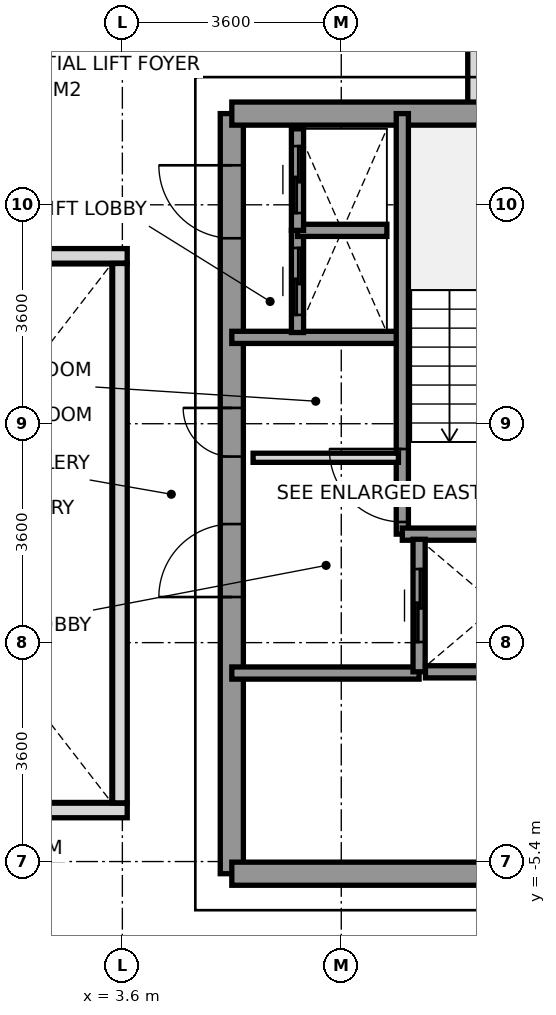
"""IFC4 building model, lengths in metres.
Left out: names, types, materials, properties, quantities, classifications, styles, units other than length and angle.
Written with IfcOpenShell. Run it as: python <this file> out.ifc"""

import sys

from ifc_helpers import new_model, si_unit, direction, frame, frame_2d, origin, place, context, subcontext, project, spatial, rectangle, extrude, source, transform, mapped, element, fill, save


model = new_model("IFC4")
c1 = context("Model", 3, precision=1e-05, world=origin(), true_north=direction((0.0, 1.0)))
c2 = subcontext(c1, "Body", "Model", "MODEL_VIEW")
j1 = project(units=[si_unit("LENGTHUNIT", "METRE"), si_unit("PLANEANGLEUNIT", "RADIAN")], contexts=[c1])
p1 = place(None, origin())
s1 = spatial("IfcSite", under=j1, at=p1, CompositionType="ELEMENT")
p2 = place(p1, origin())
s2 = spatial("IfcBuilding", under=s1, at=p2, CompositionType="ELEMENT")
p3 = place(p2, frame((0.0, 0.0, 211.4)))
s3 = spatial("IfcBuildingStorey", under=s2, at=p3, CompositionType="ELEMENT", Elevation=211.4)
p4 = place(p3, frame((9.4, 8.547, 0.0), z_axis=(0.0, 0.0, 1.0), x_axis=(0.0, -1.0, 0.0)))
e1 = element("IfcWall", 1, at=p4, inside=s3, PredefinedType="PARAPET", context=c2, shape_type="SweptSolid", body=[
    extrude(rectangle(XDim=1.594, YDim=0.24, at=frame_2d((0.797, 0.0))), origin(), (0.0, 0.0, 1.0), 1.15),
])
p5 = place(p3, frame((5.4, -5.6, 0.0), z_axis=(0.0, 0.0, 1.0), x_axis=(0.0, 1.0, 0.0)))
e2 = element("IfcWall", 2, at=p5, inside=s3, PredefinedType="SHEAR", context=c2, shape_type="SweptSolid", body=[
    extrude(rectangle(XDim=12.5, YDim=0.38, at=frame_2d((6.25, 0.0))), origin(), (0.0, 0.0, 1.0), 3.14),
])
p6 = place(p5, frame((4.55, 0.0, 0.0)))
e3 = element("IfcOpeningElement", 3, at=p6, cuts=e2, PredefinedType="OPENING", context=c2, shape_type="SweptSolid", body=[
    extrude(rectangle(XDim=1.2, YDim=2.2, at=frame_2d((0.6, 1.1))), frame((0.0, 0.2, 0.0), z_axis=(0.0, -1.0, 0.0), x_axis=(1.0, 0.0, 0.0)), (0.0, 0.0, 1.0), 0.4),
])
p7 = place(p5, frame((10.45, 0.0, 0.0)))
e4 = element("IfcOpeningElement", 4, at=p7, cuts=e2, PredefinedType="OPENING", context=c2, shape_type="SweptSolid", body=[
    extrude(rectangle(XDim=1.2, YDim=2.2, at=frame_2d((0.6, 1.1))), frame((0.0, 0.2, 0.0), z_axis=(0.0, -1.0, 0.0), x_axis=(1.0, 0.0, 0.0)), (0.0, 0.0, 1.0), 0.4),
])
p8 = place(p5, frame((6.86, 0.0, 0.0)))
e5 = element("IfcOpeningElement", 5, at=p8, cuts=e2, PredefinedType="OPENING", context=c2, shape_type="SweptSolid", body=[
    extrude(rectangle(XDim=0.8, YDim=2.1, at=frame_2d((0.4, 1.05))), frame((0.0, 0.2, 0.0), z_axis=(0.0, -1.0, 0.0), x_axis=(1.0, 0.0, 0.0)), (0.0, 0.0, 1.0), 0.4),
])
p9 = place(p3, frame((5.4, 6.9, 0.0), z_axis=(0.0, 0.0, 1.0), x_axis=(1.0, 0.0, 0.0)))
e6 = element("IfcWall", 6, at=p9, inside=s3, PredefinedType="SHEAR", context=c2, shape_type="SweptSolid", body=[
    extrude(rectangle(XDim=5.956, YDim=0.38, at=frame_2d((2.978, 0.0))), origin(), (0.0, 0.0, 1.0), 3.14),
])
p10 = place(p3, frame((5.4, -5.6, 0.0), z_axis=(0.0, 0.0, 1.0), x_axis=(1.0, 0.0, 0.0)))
e7 = element("IfcWall", 7, at=p10, inside=s3, PredefinedType="SHEAR", context=c2, shape_type="SweptSolid", body=[
    extrude(rectangle(XDim=7.8, YDim=0.38, at=frame_2d((3.9, 0.0))), origin(), (0.0, 0.0, 1.0), 3.14),
])
p11 = place(p3, frame((5.4, 3.22, 0.0), z_axis=(0.0, 0.0, 1.0), x_axis=(1.0, 0.0, 0.0)))
e8 = element("IfcWall", 8, at=p11, inside=s3, PredefinedType="SOLIDWALL", context=c2, shape_type="SweptSolid", body=[
    extrude(rectangle(XDim=2.78, YDim=0.2, at=frame_2d((1.39, 0.0))), origin(), (0.0, 0.0, 1.0), 3.14),
])
p12 = place(p3, frame((5.4, -2.3, 0.0), z_axis=(0.0, 0.0, 1.0), x_axis=(1.0, 0.0, 0.0)))
e9 = element("IfcWall", 9, at=p12, inside=s3, PredefinedType="SOLIDWALL", context=c2, shape_type="SweptSolid", body=[
    extrude(rectangle(XDim=3.08, YDim=0.2, at=frame_2d((1.54, 0.0))), origin(), (0.0, 0.0, 1.0), 3.14),
])
p13 = place(p3, frame((8.204, -0.016, 0.0), z_axis=(0.0, 0.0, 1.0), x_axis=(0.0, 1.0, 0.0)))
e10 = element("IfcWall", 10, at=p13, inside=s3, PredefinedType="SOLIDWALL", context=c2, shape_type="SweptSolid", body=[
    extrude(rectangle(XDim=6.916, YDim=0.2, at=frame_2d((3.458, 0.0))), origin(), (0.0, 0.0, 1.0), 3.14),
])
p14 = place(p13, frame((0.2, 0.0, 0.0)))
e11 = element("IfcOpeningElement", 11, at=p14, cuts=e10, PredefinedType="OPENING", context=c2, shape_type="SweptSolid", body=[
    extrude(rectangle(XDim=1.2, YDim=2.2, at=frame_2d((0.6, 1.1))), frame((0.0, 0.11, 0.0), z_axis=(0.0, -1.0, 0.0), x_axis=(1.0, 0.0, 0.0)), (0.0, 0.0, 1.0), 0.22),
])
p15 = place(p3, frame((8.204, -0.016, 0.0), z_axis=(0.0, 0.0, 1.0), x_axis=(1.0, 0.0, 0.0)))
e12 = element("IfcWall", 12, at=p15, inside=s3, PredefinedType="SOLIDWALL", context=c2, shape_type="SweptSolid", body=[
    extrude(rectangle(XDim=3.152, YDim=0.2, at=frame_2d((1.576, 0.0))), origin(), (0.0, 0.0, 1.0), 3.14),
])
p16 = place(p3, frame((8.48, -2.28, 0.0), z_axis=(0.0, 0.0, 1.0), x_axis=(0.0, 1.0, 0.0)))
e13 = element("IfcWall", 13, at=p16, inside=s3, PredefinedType="SOLIDWALL", context=c2, shape_type="SweptSolid", body=[
    extrude(rectangle(XDim=2.18, YDim=0.2, at=frame_2d((1.09, 0.0))), origin(), (0.0, 0.0, 1.0), 3.14),
])
p17 = place(p16, frame((0.49, 0.0, 0.0)))
e14 = element("IfcOpeningElement", 14, at=p17, cuts=e13, PredefinedType="OPENING", context=c2, shape_type="SweptSolid", body=[
    extrude(rectangle(XDim=1.2, YDim=2.2, at=frame_2d((0.6, 1.1))), frame((0.0, 0.11, 0.0), z_axis=(0.0, -1.0, 0.0), x_axis=(1.0, 0.0, 0.0)), (0.0, 0.0, 1.0), 0.22),
])
p18 = place(p3, frame((8.584, -2.28, 0.0), z_axis=(0.0, 0.0, 1.0), x_axis=(1.0, 0.0, 0.0)))
e15 = element("IfcWall", 15, at=p18, inside=s3, PredefinedType="SOLIDWALL", context=c2, shape_type="SweptSolid", body=[
    extrude(rectangle(XDim=2.362, YDim=0.2, at=frame_2d((1.181, 0.0))), origin(), (0.0, 0.0, 1.0), 3.14),
])
p19 = place(p3, frame((6.48, 3.3, 0.0), z_axis=(0.0, 0.0, 1.0), x_axis=(0.0, 1.0, 0.0)))
e16 = element("IfcWall", 16, at=p19, inside=s3, PredefinedType="SOLIDWALL", context=c2, shape_type="SweptSolid", body=[
    extrude(rectangle(XDim=1.68, YDim=0.2, at=frame_2d((0.84, 0.0))), origin(), (0.0, 0.0, 1.0), 3.14),
])
p20 = place(p19, frame((0.29, 0.0, 0.0)))
e17 = element("IfcOpeningElement", 17, at=p20, cuts=e16, PredefinedType="OPENING", context=c2, shape_type="SweptSolid", body=[
    extrude(rectangle(XDim=1.1, YDim=2.2, at=frame_2d((0.55, 1.1))), frame((0.0, 0.11, 0.0), z_axis=(0.0, -1.0, 0.0), x_axis=(1.0, 0.0, 0.0)), (0.0, 0.0, 1.0), 0.22),
])
p21 = place(p3, frame((6.48, 4.98, 0.0), z_axis=(0.0, 0.0, 1.0), x_axis=(1.0, 0.0, 0.0)))
e18 = element("IfcWall", 18, at=p21, inside=s3, PredefinedType="SOLIDWALL", context=c2, shape_type="SweptSolid", body=[
    extrude(rectangle(XDim=1.47, YDim=0.2, at=frame_2d((0.735, 0.0))), origin(), (0.0, 0.0, 1.0), 3.14),
])
p22 = place(p3, frame((6.48, 4.98, 0.0), z_axis=(0.0, 0.0, 1.0), x_axis=(0.0, 1.0, 0.0)))
e19 = element("IfcWall", 19, at=p22, inside=s3, PredefinedType="SOLIDWALL", context=c2, shape_type="SweptSolid", body=[
    extrude(rectangle(XDim=1.67, YDim=0.2, at=frame_2d((0.835, 0.0))), origin(), (0.0, 0.0, 1.0), 3.14),
])
p23 = place(p22, frame((0.285, 0.0, 0.0)))
e20 = element("IfcOpeningElement", 20, at=p23, cuts=e19, PredefinedType="OPENING", context=c2, shape_type="SweptSolid", body=[
    extrude(rectangle(XDim=1.1, YDim=2.2, at=frame_2d((0.55, 1.1))), frame((0.0, 0.11, 0.0), z_axis=(0.0, -1.0, 0.0), x_axis=(1.0, 0.0, 0.0)), (0.0, 0.0, 1.0), 0.22),
])
p24 = place(p3, frame((5.75, 1.24, 0.0), z_axis=(0.0, 0.0, 1.0), x_axis=(1.0, 0.0, 0.0)))
e21 = element("IfcWall", 21, at=p24, inside=s3, PredefinedType="PARTITIONING", context=c2, shape_type="SweptSolid", body=[
    extrude(rectangle(XDim=2.39, YDim=0.15, at=frame_2d((1.195, 0.0))), origin(), (0.0, 0.0, 1.0), 2.24),
])
for number, where, z_axis, x_axis in (
    (22, (-3.68, -4.56, 0.0), (0.0, 0.0, 1.0), (1.0, 0.0, 0.0)),
    (23, (-3.68, 4.56, 0.0), (0.0, 0.0, 1.0), (1.0, 0.0, 0.0)),
):
    element("IfcWall", number, at=place(p3, frame(where, z_axis=z_axis, x_axis=x_axis)), inside=s3, PredefinedType="PARAPET", context=c2, shape_type="SweptSolid", body=[
        extrude(rectangle(XDim=7.36, YDim=0.24, at=frame_2d((3.68, 0.0))), origin(), (0.0, 0.0, 1.0), 1.15),
    ])
p25 = place(p3, frame((3.56, -4.435, 0.0), z_axis=(0.0, 0.0, 1.0), x_axis=(0.0, 1.0, 0.0)))
e24 = element("IfcWall", 24, at=p25, inside=s3, PredefinedType="PARAPET", context=c2, shape_type="SweptSolid", body=[
    extrude(rectangle(XDim=8.87, YDim=0.24, at=frame_2d((4.435, 0.0))), origin(), (0.0, 0.0, 1.0), 1.15),
])
m1 = source(origin(), c2, "Body", "SweptSolid", [
    extrude(rectangle(XDim=1.2, YDim=2.2, at=frame_2d((0.6, 1.1))), frame((0.0, 0.025, 0.0), z_axis=(0.0, -1.0, 0.0), x_axis=(1.0, 0.0, 0.0)), (0.0, 0.0, 1.0), 0.05),
])
p26 = place(p14, origin())
e25 = element("IfcDoor", 25, at=p26, inside=s3, OperationType="SINGLE_SWING_RIGHT", PredefinedType="DOOR", context=c2, shape_type="MappedRepresentation", body=[
    mapped(m1, transform((0.0, 0.0, 0.0), x_axis=(1.0, 0.0, 0.0), y_axis=(0.0, 1.0, 0.0), z_axis=(0.0, 0.0, 1.0), scale=1.0)),
])
fill(e11, e25)
p27 = place(p6, origin())
e26 = element("IfcDoor", 26, at=p27, inside=s3, OperationType="SINGLE_SWING_LEFT", PredefinedType="DOOR", context=c2, shape_type="MappedRepresentation", body=[
    mapped(m1, transform((0.0, 0.0, 0.0), x_axis=(1.0, 0.0, 0.0), y_axis=(0.0, 1.0, 0.0), z_axis=(0.0, 0.0, 1.0), scale=1.0)),
])
fill(e3, e26)
p28 = place(p7, origin())
e27 = element("IfcDoor", 27, at=p28, inside=s3, OperationType="SINGLE_SWING_RIGHT", PredefinedType="DOOR", context=c2, shape_type="MappedRepresentation", body=[
    mapped(m1, transform((0.0, 0.0, 0.0), x_axis=(1.0, 0.0, 0.0), y_axis=(0.0, 1.0, 0.0), z_axis=(0.0, 0.0, 1.0), scale=1.0)),
])
fill(e4, e27)
m2 = source(origin(), c2, "Body", "SweptSolid", [
    extrude(rectangle(XDim=0.8, YDim=2.1, at=frame_2d((0.4, 1.05))), frame((0.0, 0.025, 0.0), z_axis=(0.0, -1.0, 0.0), x_axis=(1.0, 0.0, 0.0)), (0.0, 0.0, 1.0), 0.05),
])
p29 = place(p8, origin())
e28 = element("IfcDoor", 28, at=p29, inside=s3, OperationType="SINGLE_SWING_RIGHT", PredefinedType="DOOR", context=c2, shape_type="MappedRepresentation", body=[
    mapped(m2, transform((0.0, 0.0, 0.0), x_axis=(1.0, 0.0, 0.0), y_axis=(0.0, 1.0, 0.0), z_axis=(0.0, 0.0, 1.0), scale=1.0)),
])
fill(e5, e28)
p30 = place(p17, origin())
e29 = element("IfcDoor", 29, at=p30, inside=s3, OperationType="SLIDING_TO_RIGHT", PredefinedType="DOOR", context=c2, shape_type="MappedRepresentation", body=[
    mapped(m1, transform((0.0, 0.0, 0.0), x_axis=(1.0, 0.0, 0.0), y_axis=(0.0, 1.0, 0.0), z_axis=(0.0, 0.0, 1.0), scale=1.0)),
])
fill(e14, e29)
m3 = source(origin(), c2, "Body", "SweptSolid", [
    extrude(rectangle(XDim=1.1, YDim=2.2, at=frame_2d((0.55, 1.1))), frame((0.0, 0.025, 0.0), z_axis=(0.0, -1.0, 0.0), x_axis=(1.0, 0.0, 0.0)), (0.0, 0.0, 1.0), 0.05),
])
p31 = place(p20, origin())
e30 = element("IfcDoor", 30, at=p31, inside=s3, OperationType="SLIDING_TO_LEFT", PredefinedType="DOOR", context=c2, shape_type="MappedRepresentation", body=[
    mapped(m3, transform((0.0, 0.0, 0.0), x_axis=(1.0, 0.0, 0.0), y_axis=(0.0, 1.0, 0.0), z_axis=(0.0, 0.0, 1.0), scale=1.0)),
])
fill(e17, e30)
p32 = place(p23, origin())
e31 = element("IfcDoor", 31, at=p32, inside=s3, OperationType="SLIDING_TO_LEFT", PredefinedType="DOOR", context=c2, shape_type="MappedRepresentation", body=[
    mapped(m3, transform((0.0, 0.0, 0.0), x_axis=(1.0, 0.0, 0.0), y_axis=(0.0, 1.0, 0.0), z_axis=(0.0, 0.0, 1.0), scale=1.0)),
])
fill(e20, e31)
save(model, sys.argv[1])
